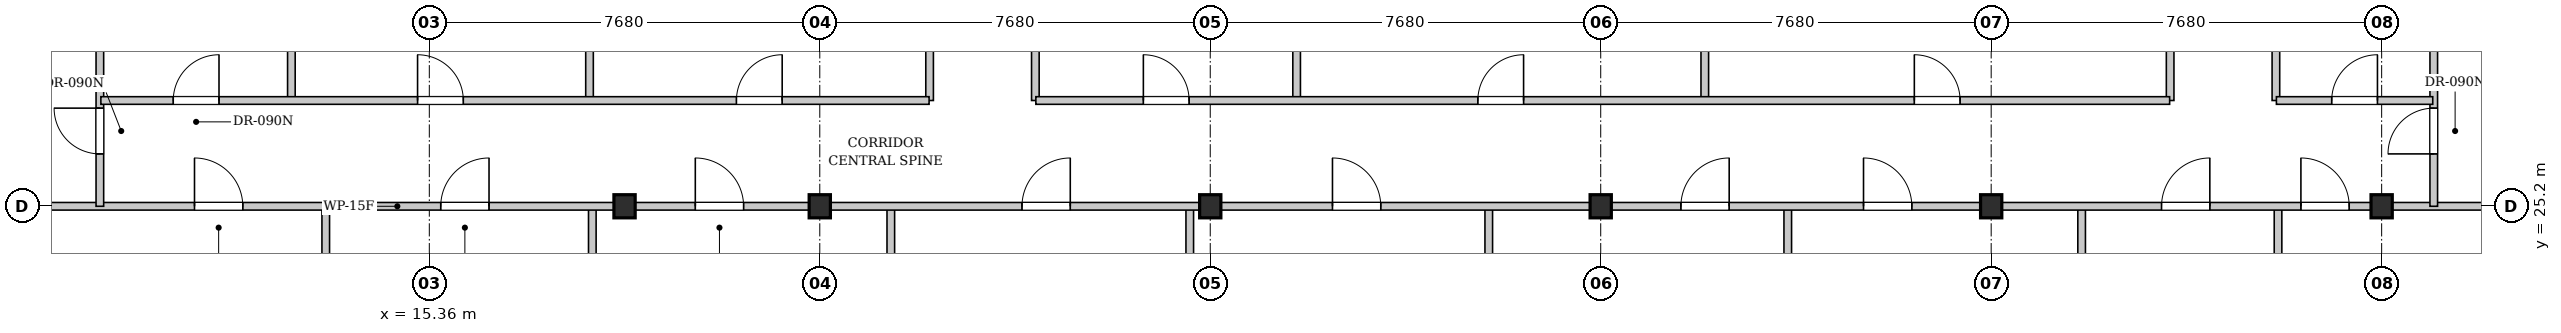
"""IFC4 building model, lengths in metres.
Left out: names, types, materials, properties, quantities, classifications, styles, units other than length and angle.
Written with IfcOpenShell. Run it as: python <this file> out.ifc"""

import sys

from ifc_helpers import new_model, si_unit, direction, frame, frame_2d, origin, origin_2d, place, context, subcontext, project, spatial, rectangle, i_section, extrude, element, fill, save


model = new_model("IFC4")
c1 = context("Model", 3, precision=1e-05, world=origin(), true_north=direction((0.0, 1.0)))
c2 = subcontext(c1, "Body", "Model", "MODEL_VIEW")
j1 = project(units=[si_unit("LENGTHUNIT", "METRE"), si_unit("PLANEANGLEUNIT", "RADIAN")], contexts=[c1])
p1 = place(None, origin())
s1 = spatial("IfcSite", under=j1, at=p1, CompositionType="ELEMENT")
p2 = place(p1, origin())
s2 = spatial("IfcBuilding", under=s1, at=p2, CompositionType="ELEMENT")
p3 = place(p2, frame((0.0, 0.0, 155.6)))
s3 = spatial("IfcBuildingStorey", under=s2, at=p3, CompositionType="ELEMENT", Elevation=155.6)
for number, where, z_axis, x_axis in (
    (1, (23.04, 25.2, 0.0), (0.0, 0.0, 1.0), (1.0, 0.0, 0.0)),
    (2, (30.72, 25.2, 0.0), (0.0, 0.0, 1.0), (1.0, 0.0, 0.0)),
    (3, (38.4, 25.2, 0.0), (0.0, 0.0, 1.0), (1.0, 0.0, 0.0)),
    (4, (46.08, 25.2, 0.0), (0.0, 0.0, 1.0), (1.0, 0.0, 0.0)),
    (5, (53.76, 25.2, 0.0), (0.0, 0.0, 1.0), (1.0, 0.0, 0.0)),
    (6, (19.2, 25.2, 0.0), (0.0, 0.0, 1.0), (1.0, 0.0, 0.0)),
):
    element("IfcColumn", number, at=place(p3, frame(where, z_axis=z_axis, x_axis=x_axis)), inside=s3, PredefinedType="COLUMN", context=c2, shape_type="SweptSolid", body=[
        extrude(i_section(OverallWidth=0.418, OverallDepth=0.455, WebThickness=0.042, FlangeThickness=0.068, FilletRadius=0.015, at=origin_2d()), origin(), (0.0, 0.0, 1.0), 3.3),
    ])
p4 = place(p3, frame((13.323, 12.879, 0.0), z_axis=(0.0, 0.0, 1.0), x_axis=(0.0, 1.0, 0.0)))
e7 = element("IfcWall", 7, at=p4, inside=s3, PredefinedType="PARTITIONING", context=c2, shape_type="SweptSolid", body=[
    extrude(rectangle(XDim=12.341, YDim=0.15, at=frame_2d((6.17, 0.0))), origin(), (0.0, 0.0, 1.0), 3.08),
])
p5 = place(p3, frame((18.566, 12.374, 0.0), z_axis=(0.0, 0.0, 1.0), x_axis=(0.0, 1.0, 0.0)))
e8 = element("IfcWall", 8, at=p5, inside=s3, PredefinedType="PARTITIONING", context=c2, shape_type="SweptSolid", body=[
    extrude(rectangle(XDim=12.846, YDim=0.15, at=frame_2d((6.423, 0.0))), origin(), (0.0, 0.0, 1.0), 2.475),
])
p6 = place(p3, frame((24.437, 11.809, 0.0), z_axis=(0.0, 0.0, 1.0), x_axis=(0.0, 1.0, 0.0)))
e9 = element("IfcWall", 9, at=p6, inside=s3, PredefinedType="PARTITIONING", context=c2, shape_type="SweptSolid", body=[
    extrude(rectangle(XDim=13.411, YDim=0.15, at=frame_2d((6.706, 0.0))), origin(), (0.0, 0.0, 1.0), 2.475),
])
p7 = place(p3, frame((30.317, 11.243, 0.0), z_axis=(0.0, 0.0, 1.0), x_axis=(0.0, 1.0, 0.0)))
e10 = element("IfcWall", 10, at=p7, inside=s3, PredefinedType="PARTITIONING", context=c2, shape_type="SweptSolid", body=[
    extrude(rectangle(XDim=13.977, YDim=0.15, at=frame_2d((6.989, 0.0))), origin(), (0.0, 0.0, 1.0), 3.08),
])
p8 = place(p3, frame((36.198, 10.677, 0.0), z_axis=(0.0, 0.0, 1.0), x_axis=(0.0, 1.0, 0.0)))
e11 = element("IfcWall", 11, at=p8, inside=s3, PredefinedType="PARTITIONING", context=c2, shape_type="SweptSolid", body=[
    extrude(rectangle(XDim=14.543, YDim=0.15, at=frame_2d((7.272, 0.0))), origin(), (0.0, 0.0, 1.0), 3.08),
])
p9 = place(p3, frame((42.079, 10.11, 0.0), z_axis=(0.0, 0.0, 1.0), x_axis=(0.0, 1.0, 0.0)))
e12 = element("IfcWall", 12, at=p9, inside=s3, PredefinedType="PARTITIONING", context=c2, shape_type="SweptSolid", body=[
    extrude(rectangle(XDim=15.11, YDim=0.15, at=frame_2d((7.555, 0.0))), origin(), (0.0, 0.0, 1.0), 3.08),
])
p10 = place(p3, frame((47.859, 9.554, 0.0), z_axis=(0.0, 0.0, 1.0), x_axis=(0.0, 1.0, 0.0)))
e13 = element("IfcWall", 13, at=p10, inside=s3, PredefinedType="PARTITIONING", context=c2, shape_type="SweptSolid", body=[
    extrude(rectangle(XDim=15.666, YDim=0.15, at=frame_2d((7.833, 0.0))), origin(), (0.0, 0.0, 1.0), 2.475),
])
p11 = place(p3, frame((51.722, 9.182, 0.0), z_axis=(0.0, 0.0, 1.0), x_axis=(0.0, 1.0, 0.0)))
e14 = element("IfcWall", 14, at=p11, inside=s3, PredefinedType="PARTITIONING", context=c2, shape_type="SweptSolid", body=[
    extrude(rectangle(XDim=16.038, YDim=0.15, at=frame_2d((8.019, 0.0))), origin(), (0.0, 0.0, 1.0), 3.08),
])
p12 = place(p3, frame((2.08, 25.2, 0.0), z_axis=(0.0, 0.0, 1.0), x_axis=(1.0, 0.0, 0.0)))
e15 = element("IfcWall", 15, at=p12, inside=s3, PredefinedType="PARTITIONING", context=c2, shape_type="SweptSolid", body=[
    extrude(rectangle(XDim=57.505, YDim=0.15, at=frame_2d((28.752, 0.0))), origin(), (0.0, 0.0, 1.0), 2.475),
])
p13 = place(p12, frame((8.662, 0.0, 0.0)))
e16 = element("IfcOpeningElement", 16, at=p13, cuts=e15, PredefinedType="OPENING", context=c2, shape_type="SweptSolid", body=[
    extrude(rectangle(XDim=0.95, YDim=2.15, at=frame_2d((0.475, 1.075))), frame((0.0, 0.085, 0.0), z_axis=(0.0, -1.0, 0.0), x_axis=(1.0, 0.0, 0.0)), (0.0, 0.0, 1.0), 0.17),
])
p14 = place(p12, frame((13.504, 0.0, 0.0)))
e17 = element("IfcOpeningElement", 17, at=p14, cuts=e15, PredefinedType="OPENING", context=c2, shape_type="SweptSolid", body=[
    extrude(rectangle(XDim=0.95, YDim=2.15, at=frame_2d((0.475, 1.075))), frame((0.0, 0.085, 0.0), z_axis=(0.0, -1.0, 0.0), x_axis=(1.0, 0.0, 0.0)), (0.0, 0.0, 1.0), 0.17),
])
p15 = place(p12, frame((18.512, 0.0, 0.0)))
e18 = element("IfcOpeningElement", 18, at=p15, cuts=e15, PredefinedType="OPENING", context=c2, shape_type="SweptSolid", body=[
    extrude(rectangle(XDim=0.95, YDim=2.15, at=frame_2d((0.475, 1.075))), frame((0.0, 0.085, 0.0), z_axis=(0.0, -1.0, 0.0), x_axis=(1.0, 0.0, 0.0)), (0.0, 0.0, 1.0), 0.17),
])
p16 = place(p12, frame((24.937, 0.0, 0.0)))
e19 = element("IfcOpeningElement", 19, at=p16, cuts=e15, PredefinedType="OPENING", context=c2, shape_type="SweptSolid", body=[
    extrude(rectangle(XDim=0.95, YDim=2.15, at=frame_2d((0.475, 1.075))), frame((0.0, 0.085, 0.0), z_axis=(0.0, -1.0, 0.0), x_axis=(1.0, 0.0, 0.0)), (0.0, 0.0, 1.0), 0.17),
])
p17 = place(p12, frame((31.044, 0.0, 0.0)))
e20 = element("IfcOpeningElement", 20, at=p17, cuts=e15, PredefinedType="OPENING", context=c2, shape_type="SweptSolid", body=[
    extrude(rectangle(XDim=0.95, YDim=2.15, at=frame_2d((0.475, 1.075))), frame((0.0, 0.085, 0.0), z_axis=(0.0, -1.0, 0.0), x_axis=(1.0, 0.0, 0.0)), (0.0, 0.0, 1.0), 0.17),
])
p18 = place(p12, frame((37.897, 0.0, 0.0)))
e21 = element("IfcOpeningElement", 21, at=p18, cuts=e15, PredefinedType="OPENING", context=c2, shape_type="SweptSolid", body=[
    extrude(rectangle(XDim=0.95, YDim=2.15, at=frame_2d((0.475, 1.075))), frame((0.0, 0.085, 0.0), z_axis=(0.0, -1.0, 0.0), x_axis=(1.0, 0.0, 0.0)), (0.0, 0.0, 1.0), 0.17),
])
p19 = place(p12, frame((41.489, 0.0, 0.0)))
e22 = element("IfcOpeningElement", 22, at=p19, cuts=e15, PredefinedType="OPENING", context=c2, shape_type="SweptSolid", body=[
    extrude(rectangle(XDim=0.95, YDim=2.15, at=frame_2d((0.475, 1.075))), frame((0.0, 0.085, 0.0), z_axis=(0.0, -1.0, 0.0), x_axis=(1.0, 0.0, 0.0)), (0.0, 0.0, 1.0), 0.17),
])
p20 = place(p12, frame((47.351, 0.0, 0.0)))
e23 = element("IfcOpeningElement", 23, at=p20, cuts=e15, PredefinedType="OPENING", context=c2, shape_type="SweptSolid", body=[
    extrude(rectangle(XDim=0.95, YDim=2.15, at=frame_2d((0.475, 1.075))), frame((0.0, 0.085, 0.0), z_axis=(0.0, -1.0, 0.0), x_axis=(1.0, 0.0, 0.0)), (0.0, 0.0, 1.0), 0.17),
])
p21 = place(p12, frame((50.092, 0.0, 0.0)))
e24 = element("IfcOpeningElement", 24, at=p21, cuts=e15, PredefinedType="OPENING", context=c2, shape_type="SweptSolid", body=[
    extrude(rectangle(XDim=0.95, YDim=2.15, at=frame_2d((0.475, 1.075))), frame((0.0, 0.085, 0.0), z_axis=(0.0, -1.0, 0.0), x_axis=(1.0, 0.0, 0.0)), (0.0, 0.0, 1.0), 0.17),
])
p22 = place(p3, frame((8.88, 25.2, 0.0), z_axis=(0.0, 0.0, 1.0), x_axis=(0.0, 1.0, 0.0)))
e25 = element("IfcWall", 25, at=p22, inside=s3, PredefinedType="PARTITIONING", context=c2, shape_type="SweptSolid", body=[
    extrude(rectangle(XDim=25.62, YDim=0.15, at=frame_2d((12.81, 0.0))), origin(), (0.0, 0.0, 1.0), 3.08),
])
p23 = place(p22, frame((1.03, 0.0, 0.0)))
e26 = element("IfcOpeningElement", 26, at=p23, cuts=e25, PredefinedType="OPENING", context=c2, shape_type="SweptSolid", body=[
    extrude(rectangle(XDim=0.9, YDim=2.15, at=frame_2d((0.45, 1.075))), frame((0.0, 0.085, 0.0), z_axis=(0.0, -1.0, 0.0), x_axis=(1.0, 0.0, 0.0)), (0.0, 0.0, 1.0), 0.17),
])
p24 = place(p3, frame((54.785, 25.2, 0.0), z_axis=(0.0, 0.0, 1.0), x_axis=(0.0, 1.0, 0.0)))
e27 = element("IfcWall", 27, at=p24, inside=s3, PredefinedType="PARTITIONING", context=c2, shape_type="SweptSolid", body=[
    extrude(rectangle(XDim=21.2, YDim=0.15, at=frame_2d((10.6, 0.0))), origin(), (0.0, 0.0, 1.0), 3.08),
])
p25 = place(p24, frame((1.03, 0.0, 0.0)))
e28 = element("IfcOpeningElement", 28, at=p25, cuts=e27, PredefinedType="OPENING", context=c2, shape_type="SweptSolid", body=[
    extrude(rectangle(XDim=0.9, YDim=2.15, at=frame_2d((0.45, 1.075))), frame((0.0, 0.085, 0.0), z_axis=(0.0, -1.0, 0.0), x_axis=(1.0, 0.0, 0.0)), (0.0, 0.0, 1.0), 0.17),
])
for number, where, z_axis, x_axis in (
    (29, (25.2, 27.28, 0.0), (0.0, 0.0, 1.0), (0.0, 1.0, 0.0)),
    (30, (27.28, 27.28, 0.0), (0.0, 0.0, 1.0), (0.0, 1.0, 0.0)),
    (31, (49.6, 27.28, 0.0), (0.0, 0.0, 1.0), (0.0, 1.0, 0.0)),
    (32, (51.68, 27.28, 0.0), (0.0, 0.0, 1.0), (0.0, 1.0, 0.0)),
    (33, (12.647, 27.28, 0.0), (0.0, 0.0, 1.0), (0.0, 1.0, 0.0)),
    (34, (18.511, 27.28, 0.0), (0.0, 0.0, 1.0), (0.0, 1.0, 0.0)),
):
    element("IfcWall", number, at=place(p3, frame(where, z_axis=z_axis, x_axis=x_axis)), inside=s3, PredefinedType="PARTITIONING", context=c2, shape_type="SweptSolid", body=[
        extrude(rectangle(XDim=5.77, YDim=0.15, at=frame_2d((2.885, 0.0))), origin(), (0.0, 0.0, 1.0), 3.08),
    ])
p26 = place(p3, frame((8.9, 27.28, 0.0), z_axis=(0.0, 0.0, 1.0), x_axis=(1.0, 0.0, 0.0)))
e35 = element("IfcWall", 35, at=p26, inside=s3, PredefinedType="PARTITIONING", context=c2, shape_type="SweptSolid", body=[
    extrude(rectangle(XDim=16.29, YDim=0.15, at=frame_2d((8.145, 0.0))), origin(), (0.0, 0.0, 1.0), 2.475),
])
p27 = place(p26, frame((1.424, 0.0, 0.0)))
e36 = element("IfcOpeningElement", 36, at=p27, cuts=e35, PredefinedType="OPENING", context=c2, shape_type="SweptSolid", body=[
    extrude(rectangle(XDim=0.9, YDim=2.15, at=frame_2d((0.45, 1.075))), frame((0.0, 0.085, 0.0), z_axis=(0.0, -1.0, 0.0), x_axis=(1.0, 0.0, 0.0)), (0.0, 0.0, 1.0), 0.17),
])
p28 = place(p26, frame((6.229, 0.0, 0.0)))
e37 = element("IfcOpeningElement", 37, at=p28, cuts=e35, PredefinedType="OPENING", context=c2, shape_type="SweptSolid", body=[
    extrude(rectangle(XDim=0.9, YDim=2.15, at=frame_2d((0.45, 1.075))), frame((0.0, 0.085, 0.0), z_axis=(0.0, -1.0, 0.0), x_axis=(1.0, 0.0, 0.0)), (0.0, 0.0, 1.0), 0.17),
])
p29 = place(p26, frame((12.5, 0.0, 0.0)))
e38 = element("IfcOpeningElement", 38, at=p29, cuts=e35, PredefinedType="OPENING", context=c2, shape_type="SweptSolid", body=[
    extrude(rectangle(XDim=0.9, YDim=2.15, at=frame_2d((0.45, 1.075))), frame((0.0, 0.085, 0.0), z_axis=(0.0, -1.0, 0.0), x_axis=(1.0, 0.0, 0.0)), (0.0, 0.0, 1.0), 0.17),
])
for number, where, z_axis, x_axis in (
    (39, (32.419, 27.28, 0.0), (0.0, 0.0, 1.0), (0.0, 1.0, 0.0)),
    (40, (40.447, 27.28, 0.0), (0.0, 0.0, 1.0), (0.0, 1.0, 0.0)),
):
    element("IfcWall", number, at=place(p3, frame(where, z_axis=z_axis, x_axis=x_axis)), inside=s3, PredefinedType="PARTITIONING", context=c2, shape_type="SweptSolid", body=[
        extrude(rectangle(XDim=5.77, YDim=0.15, at=frame_2d((2.885, 0.0))), origin(), (0.0, 0.0, 1.0), 3.08),
    ])
p30 = place(p3, frame((27.29, 27.28, 0.0), z_axis=(0.0, 0.0, 1.0), x_axis=(1.0, 0.0, 0.0)))
e41 = element("IfcWall", 41, at=p30, inside=s3, PredefinedType="PARTITIONING", context=c2, shape_type="SweptSolid", body=[
    extrude(rectangle(XDim=22.3, YDim=0.15, at=frame_2d((11.15, 0.0))), origin(), (0.0, 0.0, 1.0), 3.08),
])
p31 = place(p30, frame((2.115, 0.0, 0.0)))
e42 = element("IfcOpeningElement", 42, at=p31, cuts=e41, PredefinedType="OPENING", context=c2, shape_type="SweptSolid", body=[
    extrude(rectangle(XDim=0.9, YDim=2.15, at=frame_2d((0.45, 1.075))), frame((0.0, 0.085, 0.0), z_axis=(0.0, -1.0, 0.0), x_axis=(1.0, 0.0, 0.0)), (0.0, 0.0, 1.0), 0.17),
])
p32 = place(p30, frame((8.693, 0.0, 0.0)))
e43 = element("IfcOpeningElement", 43, at=p32, cuts=e41, PredefinedType="OPENING", context=c2, shape_type="SweptSolid", body=[
    extrude(rectangle(XDim=0.9, YDim=2.15, at=frame_2d((0.45, 1.075))), frame((0.0, 0.085, 0.0), z_axis=(0.0, -1.0, 0.0), x_axis=(1.0, 0.0, 0.0)), (0.0, 0.0, 1.0), 0.17),
])
p33 = place(p30, frame((17.279, 0.0, 0.0)))
e44 = element("IfcOpeningElement", 44, at=p33, cuts=e41, PredefinedType="OPENING", context=c2, shape_type="SweptSolid", body=[
    extrude(rectangle(XDim=0.9, YDim=2.15, at=frame_2d((0.45, 1.075))), frame((0.0, 0.085, 0.0), z_axis=(0.0, -1.0, 0.0), x_axis=(1.0, 0.0, 0.0)), (0.0, 0.0, 1.0), 0.17),
])
p34 = place(p3, frame((51.69, 27.28, 0.0), z_axis=(0.0, 0.0, 1.0), x_axis=(1.0, 0.0, 0.0)))
e45 = element("IfcWall", 45, at=p34, inside=s3, PredefinedType="PARTITIONING", context=c2, shape_type="SweptSolid", body=[
    extrude(rectangle(XDim=3.075, YDim=0.15, at=frame_2d((1.538, 0.0))), origin(), (0.0, 0.0, 1.0), 3.08),
])
p35 = place(p34, frame((1.087, 0.0, 0.0)))
e46 = element("IfcOpeningElement", 46, at=p35, cuts=e45, PredefinedType="OPENING", context=c2, shape_type="SweptSolid", body=[
    extrude(rectangle(XDim=0.9, YDim=2.15, at=frame_2d((0.45, 1.075))), frame((0.0, 0.085, 0.0), z_axis=(0.0, -1.0, 0.0), x_axis=(1.0, 0.0, 0.0)), (0.0, 0.0, 1.0), 0.17),
])
p36 = place(p13, origin())
e47 = element("IfcDoor", 47, at=p36, inside=s3, OperationType="SINGLE_SWING_LEFT", PredefinedType="DOOR", context=c2, shape_type="SweptSolid", body=[
    extrude(rectangle(XDim=0.95, YDim=2.15, at=frame_2d((0.475, 1.075))), frame((0.0, 0.025, 0.0), z_axis=(0.0, -1.0, 0.0), x_axis=(1.0, 0.0, 0.0)), (0.0, 0.0, 1.0), 0.05),
])
fill(e16, e47)
p37 = place(p14, origin())
e48 = element("IfcDoor", 48, at=p37, inside=s3, OperationType="SINGLE_SWING_RIGHT", PredefinedType="DOOR", context=c2, shape_type="SweptSolid", body=[
    extrude(rectangle(XDim=0.95, YDim=2.15, at=frame_2d((0.475, 1.075))), frame((0.0, 0.025, 0.0), z_axis=(0.0, -1.0, 0.0), x_axis=(1.0, 0.0, 0.0)), (0.0, 0.0, 1.0), 0.05),
])
fill(e17, e48)
p38 = place(p15, origin())
e49 = element("IfcDoor", 49, at=p38, inside=s3, OperationType="SINGLE_SWING_LEFT", PredefinedType="DOOR", context=c2, shape_type="SweptSolid", body=[
    extrude(rectangle(XDim=0.95, YDim=2.15, at=frame_2d((0.475, 1.075))), frame((0.0, 0.025, 0.0), z_axis=(0.0, -1.0, 0.0), x_axis=(1.0, 0.0, 0.0)), (0.0, 0.0, 1.0), 0.05),
])
fill(e18, e49)
p39 = place(p16, origin())
e50 = element("IfcDoor", 50, at=p39, inside=s3, OperationType="SINGLE_SWING_RIGHT", PredefinedType="DOOR", context=c2, shape_type="SweptSolid", body=[
    extrude(rectangle(XDim=0.95, YDim=2.15, at=frame_2d((0.475, 1.075))), frame((0.0, 0.025, 0.0), z_axis=(0.0, -1.0, 0.0), x_axis=(1.0, 0.0, 0.0)), (0.0, 0.0, 1.0), 0.05),
])
fill(e19, e50)
p40 = place(p17, origin())
e51 = element("IfcDoor", 51, at=p40, inside=s3, OperationType="SINGLE_SWING_LEFT", PredefinedType="DOOR", context=c2, shape_type="SweptSolid", body=[
    extrude(rectangle(XDim=0.95, YDim=2.15, at=frame_2d((0.475, 1.075))), frame((0.0, 0.025, 0.0), z_axis=(0.0, -1.0, 0.0), x_axis=(1.0, 0.0, 0.0)), (0.0, 0.0, 1.0), 0.05),
])
fill(e20, e51)
p41 = place(p18, origin())
e52 = element("IfcDoor", 52, at=p41, inside=s3, OperationType="SINGLE_SWING_RIGHT", PredefinedType="DOOR", context=c2, shape_type="SweptSolid", body=[
    extrude(rectangle(XDim=0.95, YDim=2.15, at=frame_2d((0.475, 1.075))), frame((0.0, 0.025, 0.0), z_axis=(0.0, -1.0, 0.0), x_axis=(1.0, 0.0, 0.0)), (0.0, 0.0, 1.0), 0.05),
])
fill(e21, e52)
p42 = place(p19, origin())
e53 = element("IfcDoor", 53, at=p42, inside=s3, OperationType="SINGLE_SWING_LEFT", PredefinedType="DOOR", context=c2, shape_type="SweptSolid", body=[
    extrude(rectangle(XDim=0.95, YDim=2.15, at=frame_2d((0.475, 1.075))), frame((0.0, 0.025, 0.0), z_axis=(0.0, -1.0, 0.0), x_axis=(1.0, 0.0, 0.0)), (0.0, 0.0, 1.0), 0.05),
])
fill(e22, e53)
p43 = place(p20, origin())
e54 = element("IfcDoor", 54, at=p43, inside=s3, OperationType="SINGLE_SWING_RIGHT", PredefinedType="DOOR", context=c2, shape_type="SweptSolid", body=[
    extrude(rectangle(XDim=0.95, YDim=2.15, at=frame_2d((0.475, 1.075))), frame((0.0, 0.025, 0.0), z_axis=(0.0, -1.0, 0.0), x_axis=(1.0, 0.0, 0.0)), (0.0, 0.0, 1.0), 0.05),
])
fill(e23, e54)
p44 = place(p21, origin())
e55 = element("IfcDoor", 55, at=p44, inside=s3, OperationType="SINGLE_SWING_LEFT", PredefinedType="DOOR", context=c2, shape_type="SweptSolid", body=[
    extrude(rectangle(XDim=0.95, YDim=2.15, at=frame_2d((0.475, 1.075))), frame((0.0, 0.025, 0.0), z_axis=(0.0, -1.0, 0.0), x_axis=(1.0, 0.0, 0.0)), (0.0, 0.0, 1.0), 0.05),
])
fill(e24, e55)
p45 = place(p23, origin())
e56 = element("IfcDoor", 56, at=p45, inside=s3, OperationType="SINGLE_SWING_RIGHT", PredefinedType="DOOR", context=c2, shape_type="SweptSolid", body=[
    extrude(rectangle(XDim=0.9, YDim=2.15, at=frame_2d((0.45, 1.075))), frame((0.0, 0.025, 0.0), z_axis=(0.0, -1.0, 0.0), x_axis=(1.0, 0.0, 0.0)), (0.0, 0.0, 1.0), 0.05),
])
fill(e26, e56)
p46 = place(p25, origin())
e57 = element("IfcDoor", 57, at=p46, inside=s3, OperationType="SINGLE_SWING_LEFT", PredefinedType="DOOR", context=c2, shape_type="SweptSolid", body=[
    extrude(rectangle(XDim=0.9, YDim=2.15, at=frame_2d((0.45, 1.075))), frame((0.0, 0.025, 0.0), z_axis=(0.0, -1.0, 0.0), x_axis=(1.0, 0.0, 0.0)), (0.0, 0.0, 1.0), 0.05),
])
fill(e28, e57)
p47 = place(p27, origin())
e58 = element("IfcDoor", 58, at=p47, inside=s3, OperationType="SINGLE_SWING_RIGHT", PredefinedType="DOOR", context=c2, shape_type="SweptSolid", body=[
    extrude(rectangle(XDim=0.9, YDim=2.15, at=frame_2d((0.45, 1.075))), frame((0.0, 0.025, 0.0), z_axis=(0.0, -1.0, 0.0), x_axis=(1.0, 0.0, 0.0)), (0.0, 0.0, 1.0), 0.05),
])
fill(e36, e58)
p48 = place(p28, origin())
e59 = element("IfcDoor", 59, at=p48, inside=s3, OperationType="SINGLE_SWING_LEFT", PredefinedType="DOOR", context=c2, shape_type="SweptSolid", body=[
    extrude(rectangle(XDim=0.9, YDim=2.15, at=frame_2d((0.45, 1.075))), frame((0.0, 0.025, 0.0), z_axis=(0.0, -1.0, 0.0), x_axis=(1.0, 0.0, 0.0)), (0.0, 0.0, 1.0), 0.05),
])
fill(e37, e59)
p49 = place(p29, origin())
e60 = element("IfcDoor", 60, at=p49, inside=s3, OperationType="SINGLE_SWING_RIGHT", PredefinedType="DOOR", context=c2, shape_type="SweptSolid", body=[
    extrude(rectangle(XDim=0.9, YDim=2.15, at=frame_2d((0.45, 1.075))), frame((0.0, 0.025, 0.0), z_axis=(0.0, -1.0, 0.0), x_axis=(1.0, 0.0, 0.0)), (0.0, 0.0, 1.0), 0.05),
])
fill(e38, e60)
p50 = place(p31, origin())
e61 = element("IfcDoor", 61, at=p50, inside=s3, OperationType="SINGLE_SWING_LEFT", PredefinedType="DOOR", context=c2, shape_type="SweptSolid", body=[
    extrude(rectangle(XDim=0.9, YDim=2.15, at=frame_2d((0.45, 1.075))), frame((0.0, 0.025, 0.0), z_axis=(0.0, -1.0, 0.0), x_axis=(1.0, 0.0, 0.0)), (0.0, 0.0, 1.0), 0.05),
])
fill(e42, e61)
p51 = place(p32, origin())
e62 = element("IfcDoor", 62, at=p51, inside=s3, OperationType="SINGLE_SWING_RIGHT", PredefinedType="DOOR", context=c2, shape_type="SweptSolid", body=[
    extrude(rectangle(XDim=0.9, YDim=2.15, at=frame_2d((0.45, 1.075))), frame((0.0, 0.025, 0.0), z_axis=(0.0, -1.0, 0.0), x_axis=(1.0, 0.0, 0.0)), (0.0, 0.0, 1.0), 0.05),
])
fill(e43, e62)
p52 = place(p33, origin())
e63 = element("IfcDoor", 63, at=p52, inside=s3, OperationType="SINGLE_SWING_LEFT", PredefinedType="DOOR", context=c2, shape_type="SweptSolid", body=[
    extrude(rectangle(XDim=0.9, YDim=2.15, at=frame_2d((0.45, 1.075))), frame((0.0, 0.025, 0.0), z_axis=(0.0, -1.0, 0.0), x_axis=(1.0, 0.0, 0.0)), (0.0, 0.0, 1.0), 0.05),
])
fill(e44, e63)
p53 = place(p35, origin())
e64 = element("IfcDoor", 64, at=p53, inside=s3, OperationType="SINGLE_SWING_RIGHT", PredefinedType="DOOR", context=c2, shape_type="SweptSolid", body=[
    extrude(rectangle(XDim=0.9, YDim=2.15, at=frame_2d((0.45, 1.075))), frame((0.0, 0.025, 0.0), z_axis=(0.0, -1.0, 0.0), x_axis=(1.0, 0.0, 0.0)), (0.0, 0.0, 1.0), 0.05),
])
fill(e46, e64)
save(model, sys.argv[1])
